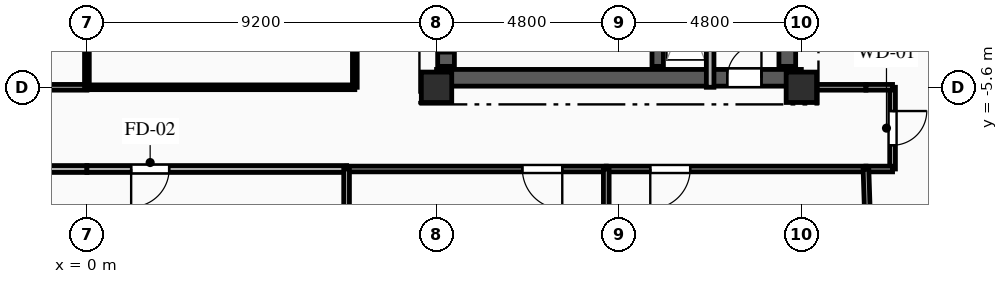
"""IFC4 building model, lengths in metres.
Left out: names, types, materials, properties, quantities, classifications, styles, units other than length and angle.
Written with IfcOpenShell. Run it as: python <this file> out.ifc"""

import sys

from ifc_helpers import new_model, si_unit, direction, frame, frame_2d, origin, origin_2d, place, context, subcontext, project, spatial, rectangle, extrude, element, fill, save


model = new_model("IFC4")
c1 = context("Model", 3, precision=1e-05, world=origin(), true_north=direction((0.0, 1.0)))
c2 = subcontext(c1, "Body", "Model", "MODEL_VIEW")
j1 = project(units=[si_unit("LENGTHUNIT", "METRE"), si_unit("PLANEANGLEUNIT", "RADIAN")], contexts=[c1])
p1 = place(None, origin())
s1 = spatial("IfcSite", under=j1, at=p1, CompositionType="ELEMENT")
p2 = place(p1, origin())
s2 = spatial("IfcBuilding", under=s1, at=p2, CompositionType="ELEMENT")
p3 = place(p2, frame((0.0, 0.0, 231.65)))
s3 = spatial("IfcBuildingStorey", under=s2, at=p3, CompositionType="ELEMENT", Elevation=231.65)
for number, where, z_axis, x_axis in (
    (1, (9.2, -5.6, 0.0), (0.0, 0.0, 1.0), (1.0, 0.0, 0.0)),
    (2, (18.8, -5.6, 0.0), (0.0, 0.0, 1.0), (1.0, 0.0, 0.0)),
):
    element("IfcColumn", number, at=place(p3, frame(where, z_axis=z_axis, x_axis=x_axis)), inside=s3, PredefinedType="COLUMN", context=c2, shape_type="SweptSolid", body=[
        extrude(rectangle(XDim=0.8, YDim=0.8, at=origin_2d()), origin(), (0.0, 0.0, 1.0), 3.35),
    ])
p4 = place(p3, frame((9.2, -5.35, 0.0), z_axis=(0.0, 0.0, 1.0), x_axis=(1.0, 0.0, 0.0)))
e3 = element("IfcWall", 3, at=p4, inside=s3, PredefinedType="SHEAR", context=c2, shape_type="SweptSolid", body=[
    extrude(rectangle(XDim=9.6, YDim=0.44, at=frame_2d((4.8, 0.0))), origin(), (0.0, 0.0, 1.0), 3.04),
])
p5 = place(p4, frame((7.65, 0.0, 0.0)))
e4 = element("IfcOpeningElement", 4, at=p5, cuts=e3, PredefinedType="OPENING", context=c2, shape_type="SweptSolid", body=[
    extrude(rectangle(XDim=0.9, YDim=2.1, at=frame_2d((0.45, 1.05))), frame((0.0, 0.23, 0.0), z_axis=(0.0, -1.0, 0.0), x_axis=(1.0, 0.0, 0.0)), (0.0, 0.0, 1.0), 0.46),
])
p6 = place(p3, frame((9.45, -5.05, 0.0), z_axis=(0.0, 0.0, 1.0), x_axis=(0.0, 1.0, 0.0)))
e5 = element("IfcWall", 5, at=p6, inside=s3, PredefinedType="SHEAR", context=c2, shape_type="SweptSolid", body=[
    extrude(rectangle(XDim=10.1, YDim=0.44, at=frame_2d((5.05, 0.0))), origin(), (0.0, 0.0, 1.0), 3.04),
])
p7 = place(p6, frame((7.15, 0.0, 0.0)))
e6 = element("IfcOpeningElement", 6, at=p7, cuts=e5, PredefinedType="OPENING", context=c2, shape_type="SweptSolid", body=[
    extrude(rectangle(XDim=0.9, YDim=2.1, at=frame_2d((0.45, 1.05))), frame((0.0, 0.23, 0.0), z_axis=(0.0, -1.0, 0.0), x_axis=(1.0, 0.0, 0.0)), (0.0, 0.0, 1.0), 0.46),
])
p8 = place(p6, frame((2.4, 0.0, 0.0)))
e7 = element("IfcOpeningElement", 7, at=p8, cuts=e5, PredefinedType="OPENING", context=c2, shape_type="SweptSolid", body=[
    extrude(rectangle(XDim=1.2, YDim=2.15, at=frame_2d((0.6, 1.075))), frame((0.0, 0.23, 0.0), z_axis=(0.0, -1.0, 0.0), x_axis=(1.0, 0.0, 0.0)), (0.0, 0.0, 1.0), 0.46),
])
p9 = place(p6, frame((0.35, 0.0, 0.0)))
e8 = element("IfcOpeningElement", 8, at=p9, cuts=e5, PredefinedType="OPENING", context=c2, shape_type="SweptSolid", body=[
    extrude(rectangle(XDim=0.9, YDim=2.1, at=frame_2d((0.45, 1.05))), frame((0.0, 0.23, 0.0), z_axis=(0.0, -1.0, 0.0), x_axis=(1.0, 0.0, 0.0)), (0.0, 0.0, 1.0), 0.46),
])
p10 = place(p3, frame((18.43, -5.05, 0.0), z_axis=(0.0, 0.0, 1.0), x_axis=(0.0, 1.0, 0.0)))
e9 = element("IfcWall", 9, at=p10, inside=s3, PredefinedType="SHEAR", context=c2, shape_type="SweptSolid", body=[
    extrude(rectangle(XDim=10.1, YDim=0.44, at=frame_2d((5.05, 0.0))), origin(), (0.0, 0.0, 1.0), 3.04),
])
p11 = place(p3, frame((15.02, -5.05, 0.0), z_axis=(0.0, 0.0, 1.0), x_axis=(0.0, 1.0, 0.0)))
e10 = element("IfcWall", 10, at=p11, inside=s3, PredefinedType="SHEAR", context=c2, shape_type="SweptSolid", body=[
    extrude(rectangle(XDim=10.1, YDim=0.3, at=frame_2d((5.05, 0.0))), origin(), (0.0, 0.0, 1.0), 3.04),
])
p12 = place(p3, frame((16.4, -2.11, 0.0), z_axis=(0.0, 0.0, 1.0), x_axis=(0.0, -1.0, 0.0)))
e11 = element("IfcWall", 11, at=p12, inside=s3, PredefinedType="PARTITIONING", context=c2, shape_type="SweptSolid", body=[
    extrude(rectangle(XDim=3.49, YDim=0.2, at=frame_2d((1.745, 0.0))), origin(), (0.0, 0.0, 1.0), 3.04),
])
p13 = place(p3, frame((0.0, -7.75, 0.0), z_axis=(0.0, 0.0, 1.0), x_axis=(-1.0, 0.0, 0.0)))
e12 = element("IfcWall", 12, at=p13, inside=s3, PredefinedType="PARTITIONING", context=c2, shape_type="SweptSolid", body=[
    extrude(rectangle(XDim=4.383, YDim=0.18, at=frame_2d((2.191, 0.0))), origin(), (0.0, 0.0, 1.0), 3.04),
])
p14 = place(p3, frame((-7.05, -5.6, 0.0), z_axis=(0.0, 0.0, 1.0), x_axis=(1.0, 0.0, 0.0)))
e13 = element("IfcWall", 13, at=p14, inside=s3, PredefinedType="PARTITIONING", context=c2, shape_type="SweptSolid", body=[
    extrude(rectangle(XDim=7.05, YDim=0.15, at=frame_2d((3.525, 0.0))), origin(), (0.0, 0.0, 1.0), 2.525),
])
p15 = place(p3, frame((21.2, -5.6, 0.0), z_axis=(0.0, 0.0, 1.0), x_axis=(0.0, -1.0, 0.0)))
e14 = element("IfcWall", 14, at=p15, inside=s3, PredefinedType="PARTITIONING", context=c2, shape_type="SweptSolid", body=[
    extrude(rectangle(XDim=2.15, YDim=0.15, at=frame_2d((1.075, 0.0))), origin(), (0.0, 0.0, 1.0), 3.04),
])
p16 = place(p15, frame((0.625, 0.0, 0.0)))
e15 = element("IfcOpeningElement", 15, at=p16, cuts=e14, PredefinedType="OPENING", context=c2, shape_type="SweptSolid", body=[
    extrude(rectangle(XDim=0.9, YDim=2.1, at=frame_2d((0.45, 1.05))), frame((0.0, 0.085, 0.0), z_axis=(0.0, -1.0, 0.0), x_axis=(1.0, 0.0, 0.0)), (0.0, 0.0, 1.0), 0.17),
])
p17 = place(p3, frame((18.8, -5.6, 0.0), z_axis=(0.0, 0.0, 1.0), x_axis=(1.0, 0.0, 0.0)))
e16 = element("IfcWall", 16, at=p17, inside=s3, PredefinedType="PARTITIONING", context=c2, shape_type="SweptSolid", body=[
    extrude(rectangle(XDim=1.7, YDim=0.15, at=frame_2d((0.85, 0.0))), origin(), (0.0, 0.0, 1.0), 3.04),
])
for number, where, z_axis, x_axis in (
    (17, (20.5, -5.6, 0.0), (0.0, 0.0, 1.0), (1.0, 0.0, 0.0)),
    (18, (21.2, -7.75, 0.0), (0.0, 0.0, 1.0), (-1.0, 0.0, 0.0)),
):
    element("IfcWall", number, at=place(p3, frame(where, z_axis=z_axis, x_axis=x_axis)), inside=s3, PredefinedType="PARTITIONING", context=c2, shape_type="SweptSolid", body=[
        extrude(rectangle(XDim=0.7, YDim=0.15, at=frame_2d((0.35, 0.0))), origin(), (0.0, 0.0, 1.0), 3.04),
    ])
p18 = place(p3, frame((6.833, -7.75, 0.0), z_axis=(0.0, 0.0, 1.0), x_axis=(-1.0, 0.0, 0.0)))
e19 = element("IfcWall", 19, at=p18, inside=s3, PredefinedType="PARTITIONING", context=c2, shape_type="SweptSolid", body=[
    extrude(rectangle(XDim=6.833, YDim=0.18, at=frame_2d((3.417, 0.0))), origin(), (0.0, 0.0, 1.0), 3.04),
])
p19 = place(p18, frame((4.669, 0.0, 0.0)))
e20 = element("IfcOpeningElement", 20, at=p19, cuts=e19, PredefinedType="OPENING", context=c2, shape_type="SweptSolid", body=[
    extrude(rectangle(XDim=1.0, YDim=2.15, at=frame_2d((0.5, 1.075))), frame((0.0, 0.1, 0.0), z_axis=(0.0, -1.0, 0.0), x_axis=(1.0, 0.0, 0.0)), (0.0, 0.0, 1.0), 0.2),
])
p20 = place(p3, frame((13.667, -7.75, 0.0), z_axis=(0.0, 0.0, 1.0), x_axis=(-1.0, 0.0, 0.0)))
e21 = element("IfcWall", 21, at=p20, inside=s3, PredefinedType="PARTITIONING", context=c2, shape_type="SweptSolid", body=[
    extrude(rectangle(XDim=6.833, YDim=0.15, at=frame_2d((3.417, 0.0))), origin(), (0.0, 0.0, 1.0), 3.04),
])
p21 = place(p20, frame((1.158, 0.0, 0.0)))
e22 = element("IfcOpeningElement", 22, at=p21, cuts=e21, PredefinedType="OPENING", context=c2, shape_type="SweptSolid", body=[
    extrude(rectangle(XDim=1.05, YDim=2.15, at=frame_2d((0.525, 1.075))), frame((0.0, 0.085, 0.0), z_axis=(0.0, -1.0, 0.0), x_axis=(1.0, 0.0, 0.0)), (0.0, 0.0, 1.0), 0.17),
])
p22 = place(p3, frame((20.5, -7.75, 0.0), z_axis=(0.0, 0.0, 1.0), x_axis=(-1.0, 0.0, 0.0)))
e23 = element("IfcWall", 23, at=p22, inside=s3, PredefinedType="PARTITIONING", context=c2, shape_type="SweptSolid", body=[
    extrude(rectangle(XDim=6.833, YDim=0.15, at=frame_2d((3.417, 0.0))), origin(), (0.0, 0.0, 1.0), 3.04),
])
p23 = place(p22, frame((4.625, 0.0, 0.0)))
e24 = element("IfcOpeningElement", 24, at=p23, cuts=e23, PredefinedType="OPENING", context=c2, shape_type="SweptSolid", body=[
    extrude(rectangle(XDim=1.05, YDim=2.15, at=frame_2d((0.525, 1.075))), frame((0.0, 0.085, 0.0), z_axis=(0.0, -1.0, 0.0), x_axis=(1.0, 0.0, 0.0)), (0.0, 0.0, 1.0), 0.17),
])
p24 = place(p3, frame((0.0, -5.6, 0.0), z_axis=(0.0, 0.0, 1.0), x_axis=(1.0, 0.0, 0.0)))
e25 = element("IfcWall", 25, at=p24, inside=s3, PredefinedType="PARTITIONING", context=c2, shape_type="SweptSolid", body=[
    extrude(rectangle(XDim=7.05, YDim=0.125, at=frame_2d((3.525, 0.0))), origin(), (0.0, 0.0, 1.0), 2.525),
])
p25 = place(p3, frame((7.05, -5.6, 0.0), z_axis=(0.0, 0.0, 1.0), x_axis=(0.0, 1.0, 0.0)))
e26 = element("IfcWall", 26, at=p25, inside=s3, PredefinedType="PARTITIONING", context=c2, shape_type="SweptSolid", body=[
    extrude(rectangle(XDim=14.1, YDim=0.125, at=frame_2d((7.05, 0.0))), origin(), (0.0, 0.0, 1.0), 3.04),
])
p26 = place(p25, frame((5.076, 0.0, 0.0)))
e27 = element("IfcOpeningElement", 27, at=p26, cuts=e26, PredefinedType="OPENING", context=c2, shape_type="SweptSolid", body=[
    extrude(rectangle(XDim=0.95, YDim=2.1, at=frame_2d((0.475, 1.05))), frame((0.0, 0.073, 0.0), z_axis=(0.0, -1.0, 0.0), x_axis=(1.0, 0.0, 0.0)), (0.0, 0.0, 1.0), 0.145),
])
p27 = place(p3, frame((20.8, -17.0, 0.0), z_axis=(0.0, 0.0, 1.0), x_axis=(-0.032420659042, 0.99947431226, 0.0)))
e28 = element("IfcWall", 28, at=p27, inside=s3, PredefinedType="PARTITIONING", context=c2, shape_type="SweptSolid", body=[
    extrude(rectangle(XDim=9.255, YDim=0.15, at=frame_2d((4.627, 0.0))), origin(), (0.0, 0.0, 1.0), 3.04),
])
p28 = place(p3, frame((6.833, -7.75, 0.0), z_axis=(0.0, 0.0, 1.0), x_axis=(0.0, -1.0, 0.0)))
e29 = element("IfcWall", 29, at=p28, inside=s3, PredefinedType="PARTITIONING", context=c2, shape_type="SweptSolid", body=[
    extrude(rectangle(XDim=10.65, YDim=0.15, at=frame_2d((5.325, 0.0))), origin(), (0.0, 0.0, 1.0), 2.665),
])
p29 = place(p3, frame((13.667, -7.75, 0.0), z_axis=(0.0, 0.0, 1.0), x_axis=(0.0, -1.0, 0.0)))
e30 = element("IfcWall", 30, at=p29, inside=s3, PredefinedType="PARTITIONING", context=c2, shape_type="SweptSolid", body=[
    extrude(rectangle(XDim=10.65, YDim=0.15, at=frame_2d((5.325, 0.0))), origin(), (0.0, 0.0, 1.0), 3.04),
])
p30 = place(p3, frame((0.0, 8.5, 0.0), z_axis=(0.0, 0.0, 1.0), x_axis=(0.0, -1.0, 0.0)))
e31 = element("IfcWall", 31, at=p30, inside=s3, PredefinedType="PARTITIONING", context=c2, shape_type="SweptSolid", body=[
    extrude(rectangle(XDim=14.1, YDim=0.125, at=frame_2d((7.05, 0.0))), origin(), (0.0, 0.0, 1.0), 3.04),
])
p31 = place(p5, origin())
e32 = element("IfcDoor", 32, at=p31, inside=s3, OperationType="SINGLE_SWING_RIGHT", PredefinedType="DOOR", context=c2, shape_type="SweptSolid", body=[
    extrude(rectangle(XDim=0.9, YDim=2.1, at=frame_2d((0.45, 1.05))), frame((0.0, 0.025, 0.0), z_axis=(0.0, -1.0, 0.0), x_axis=(1.0, 0.0, 0.0)), (0.0, 0.0, 1.0), 0.05),
])
fill(e4, e32)
p32 = place(p9, origin())
e33 = element("IfcDoor", 33, at=p32, inside=s3, OperationType="SINGLE_SWING_RIGHT", PredefinedType="DOOR", context=c2, shape_type="SweptSolid", body=[
    extrude(rectangle(XDim=0.9, YDim=2.1, at=frame_2d((0.45, 1.05))), frame((0.0, 0.025, 0.0), z_axis=(0.0, -1.0, 0.0), x_axis=(1.0, 0.0, 0.0)), (0.0, 0.0, 1.0), 0.05),
])
fill(e8, e33)
p33 = place(p16, origin())
e34 = element("IfcDoor", 34, at=p33, inside=s3, OperationType="SINGLE_SWING_LEFT", PredefinedType="DOOR", context=c2, shape_type="SweptSolid", body=[
    extrude(rectangle(XDim=0.9, YDim=2.1, at=frame_2d((0.45, 1.05))), frame((0.0, 0.025, 0.0), z_axis=(0.0, -1.0, 0.0), x_axis=(1.0, 0.0, 0.0)), (0.0, 0.0, 1.0), 0.05),
])
fill(e15, e34)
p34 = place(p19, origin())
e35 = element("IfcDoor", 35, at=p34, inside=s3, OperationType="SINGLE_SWING_RIGHT", PredefinedType="DOOR", context=c2, shape_type="SweptSolid", body=[
    extrude(rectangle(XDim=1.0, YDim=2.15, at=frame_2d((0.5, 1.075))), frame((0.0, 0.025, 0.0), z_axis=(0.0, -1.0, 0.0), x_axis=(1.0, 0.0, 0.0)), (0.0, 0.0, 1.0), 0.05),
])
fill(e20, e35)
p35 = place(p21, origin())
e36 = element("IfcDoor", 36, at=p35, inside=s3, OperationType="SINGLE_SWING_LEFT", PredefinedType="DOOR", context=c2, shape_type="SweptSolid", body=[
    extrude(rectangle(XDim=1.05, YDim=2.15, at=frame_2d((0.525, 1.075))), frame((0.0, 0.025, 0.0), z_axis=(0.0, -1.0, 0.0), x_axis=(1.0, 0.0, 0.0)), (0.0, 0.0, 1.0), 0.05),
])
fill(e22, e36)
p36 = place(p23, origin())
e37 = element("IfcDoor", 37, at=p36, inside=s3, OperationType="SINGLE_SWING_RIGHT", PredefinedType="DOOR", context=c2, shape_type="SweptSolid", body=[
    extrude(rectangle(XDim=1.05, YDim=2.15, at=frame_2d((0.525, 1.075))), frame((0.0, 0.025, 0.0), z_axis=(0.0, -1.0, 0.0), x_axis=(1.0, 0.0, 0.0)), (0.0, 0.0, 1.0), 0.05),
])
fill(e24, e37)
save(model, sys.argv[1])
